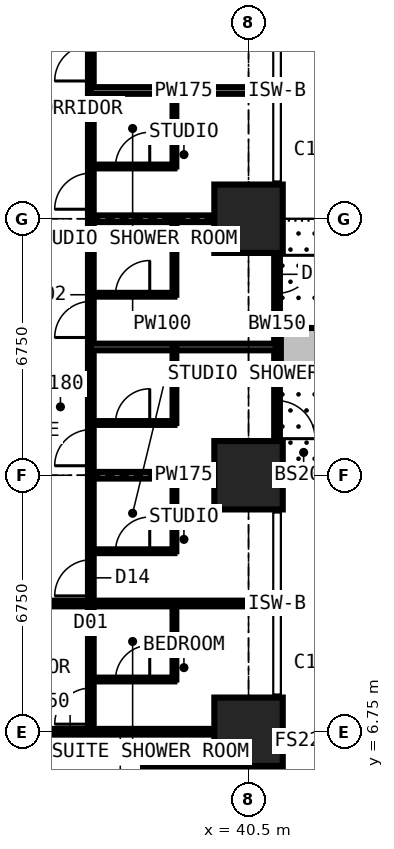
"""IFC4 building model, lengths in metres.
Left out: names, types, materials, properties, quantities, classifications, styles, units other than length and angle.
Written with IfcOpenShell. Run it as: python <this file> out.ifc"""

import sys

from ifc_helpers import new_model, si_unit, direction, frame, frame_2d, origin, origin_2d, place, context, subcontext, project, spatial, rectangle, extrude, element, fill, save


model = new_model("IFC4")
c1 = context("Model", 3, precision=1e-05, world=origin(), true_north=direction((0.0, 1.0)))
c2 = subcontext(c1, "Body", "Model", "MODEL_VIEW")
j1 = project(units=[si_unit("LENGTHUNIT", "METRE"), si_unit("PLANEANGLEUNIT", "RADIAN")], contexts=[c1])
p1 = place(None, origin())
s1 = spatial("IfcSite", under=j1, at=p1, CompositionType="ELEMENT")
p2 = place(p1, origin())
s2 = spatial("IfcBuilding", under=s1, at=p2, CompositionType="ELEMENT")
p3 = place(p2, frame((0.0, 0.0, 94.5)))
s3 = spatial("IfcBuildingStorey", under=s2, at=p3, CompositionType="ELEMENT", Elevation=94.5)
for number, where, z_axis, x_axis in (
    (1, (40.5, 6.75, 0.0), (0.0, 0.0, 1.0), (1.0, 0.0, 0.0)),
    (2, (40.5, 13.5, 0.0), (0.0, 0.0, 1.0), (1.0, 0.0, 0.0)),
    (3, (40.5, 20.25, 0.0), (0.0, 0.0, 1.0), (1.0, 0.0, 0.0)),
):
    element("IfcColumn", number, at=place(p3, frame(where, z_axis=z_axis, x_axis=x_axis)), inside=s3, PredefinedType="COLUMN", context=c2, shape_type="SweptSolid", body=[
        extrude(rectangle(XDim=1.8, YDim=1.8, at=origin_2d()), origin(), (0.0, 0.0, 1.0), 3.6),
    ])
p4 = place(p3, frame((41.25, 20.25, 0.0), z_axis=(0.0, 0.0, 1.0), x_axis=(0.0, -1.0, 0.0)))
e4 = element("IfcWall", 4, at=p4, inside=s3, PredefinedType="SOLIDWALL", context=c2, shape_type="SweptSolid", body=[
    extrude(rectangle(XDim=6.75, YDim=0.15, at=frame_2d((3.375, 0.0))), origin(), (0.0, 0.0, 1.0), 3.375),
])
p5 = place(p4, frame((0.962, 0.0, 0.0)))
e5 = element("IfcOpeningElement", 5, at=p5, cuts=e4, PredefinedType="OPENING", context=c2, shape_type="SweptSolid", body=[
    extrude(rectangle(XDim=1.0, YDim=2.2, at=frame_2d((0.5, 1.1))), frame((0.0, 0.085, 0.0), z_axis=(0.0, -1.0, 0.0), x_axis=(1.0, 0.0, 0.0)), (0.0, 0.0, 1.0), 0.17),
])
p6 = place(p4, frame((2.025, 0.0, 0.9)))
e6 = element("IfcOpeningElement", 6, at=p6, cuts=e4, PredefinedType="OPENING", context=c2, shape_type="SweptSolid", body=[
    extrude(rectangle(XDim=1.2, YDim=1.8, at=frame_2d((0.6, 0.9))), frame((0.0, 0.085, 0.0), z_axis=(0.0, -1.0, 0.0), x_axis=(1.0, 0.0, 0.0)), (0.0, 0.0, 1.0), 0.17),
])
p7 = place(p4, frame((4.788, 0.0, 0.0)))
e7 = element("IfcOpeningElement", 7, at=p7, cuts=e4, PredefinedType="OPENING", context=c2, shape_type="SweptSolid", body=[
    extrude(rectangle(XDim=1.0, YDim=2.2, at=frame_2d((0.5, 1.1))), frame((0.0, 0.085, 0.0), z_axis=(0.0, -1.0, 0.0), x_axis=(1.0, 0.0, 0.0)), (0.0, 0.0, 1.0), 0.17),
])
p8 = place(p4, frame((3.525, 0.0, 0.9)))
e8 = element("IfcOpeningElement", 8, at=p8, cuts=e4, PredefinedType="OPENING", context=c2, shape_type="SweptSolid", body=[
    extrude(rectangle(XDim=1.2, YDim=1.8, at=frame_2d((0.6, 0.9))), frame((0.0, 0.085, 0.0), z_axis=(0.0, -1.0, 0.0), x_axis=(1.0, 0.0, 0.0)), (0.0, 0.0, 1.0), 0.17),
])
p9 = place(p3, frame((37.875, 2.625, 0.0), z_axis=(0.0, 0.0, 1.0), x_axis=(0.0, 1.0, 0.0)))
e9 = element("IfcWall", 9, at=p9, inside=s3, PredefinedType="SOLIDWALL", context=c2, shape_type="SweptSolid", body=[
    extrude(rectangle(XDim=3.375, YDim=0.3, at=frame_2d((1.688, 0.0))), origin(), (0.0, 0.0, 1.0), 3.375),
])
p10 = place(p9, frame((0.788, 0.0, 0.6)))
e10 = element("IfcOpeningElement", 10, at=p10, cuts=e9, PredefinedType="OPENING", context=c2, shape_type="SweptSolid", body=[
    extrude(rectangle(XDim=1.8, YDim=2.1, at=frame_2d((0.9, 1.05))), frame((0.0, 0.16, 0.0), z_axis=(0.0, -1.0, 0.0), x_axis=(1.0, 0.0, 0.0)), (0.0, 0.0, 1.0), 0.32),
])
p11 = place(p3, frame((37.875, 6.0, 0.0), z_axis=(0.0, 0.0, 1.0), x_axis=(1.0, 0.0, 0.0)))
e11 = element("IfcWall", 11, at=p11, inside=s3, PredefinedType="SOLIDWALL", context=c2, shape_type="SweptSolid", body=[
    extrude(rectangle(XDim=3.375, YDim=0.3, at=frame_2d((1.688, 0.0))), origin(), (0.0, 0.0, 1.0), 3.375),
])
p12 = place(p11, frame((0.343, 0.0, 0.9)))
e12 = element("IfcOpeningElement", 12, at=p12, cuts=e11, PredefinedType="OPENING", context=c2, shape_type="SweptSolid", body=[
    extrude(rectangle(XDim=1.2, YDim=1.8, at=frame_2d((0.6, 0.9))), frame((0.0, 0.16, 0.0), z_axis=(0.0, -1.0, 0.0), x_axis=(1.0, 0.0, 0.0)), (0.0, 0.0, 1.0), 0.32),
])
p13 = place(p3, frame((41.35, 16.875, 0.0), z_axis=(0.0, 0.0, 1.0), x_axis=(1.0, 0.0, 0.0)))
e13 = element("IfcWall", 13, at=p13, inside=s3, PredefinedType="USERDEFINED", context=c2, shape_type="SweptSolid", body=[
    extrude(rectangle(XDim=2.2, YDim=1.0, at=frame_2d((1.1, 0.0))), origin(), (0.0, 0.0, 1.0), 0.9),
])
p14 = place(p3, frame((30.375, 6.75, 0.0), z_axis=(0.0, 0.0, 1.0), x_axis=(1.0, 0.0, 0.0)))
e14 = element("IfcWall", 14, at=p14, inside=s3, PredefinedType="PARTITIONING", context=c2, shape_type="SweptSolid", body=[
    extrude(rectangle(XDim=10.859, YDim=0.15, at=frame_2d((5.429, 0.0))), origin(), (0.0, 0.0, 1.0), 2.877),
])
p15 = place(p14, frame((1.45, 0.0, 0.0)))
e15 = element("IfcOpeningElement", 15, at=p15, cuts=e14, PredefinedType="OPENING", context=c2, shape_type="SweptSolid", body=[
    extrude(rectangle(XDim=1.0, YDim=2.2, at=frame_2d((0.5, 1.1))), frame((0.0, 0.085, 0.0), z_axis=(0.0, -1.0, 0.0), x_axis=(1.0, 0.0, 0.0)), (0.0, 0.0, 1.0), 0.17),
])
p16 = place(p3, frame((30.375, 10.125, 0.0), z_axis=(0.0, 0.0, 1.0), x_axis=(1.0, 0.0, 0.0)))
e16 = element("IfcWall", 16, at=p16, inside=s3, PredefinedType="PARTITIONING", context=c2, shape_type="SweptSolid", body=[
    extrude(rectangle(XDim=10.859, YDim=0.15, at=frame_2d((5.429, 0.0))), origin(), (0.0, 0.0, 1.0), 3.375),
])
p17 = place(p16, frame((2.5, 0.0, 0.0)))
e17 = element("IfcOpeningElement", 17, at=p17, cuts=e16, PredefinedType="OPENING", context=c2, shape_type="SweptSolid", body=[
    extrude(rectangle(XDim=1.0, YDim=2.2, at=frame_2d((0.5, 1.1))), frame((0.0, 0.085, 0.0), z_axis=(0.0, -1.0, 0.0), x_axis=(1.0, 0.0, 0.0)), (0.0, 0.0, 1.0), 0.17),
])
p18 = place(p3, frame((36.35, 6.75, 0.0), z_axis=(0.0, 0.0, 1.0), x_axis=(0.0, 1.0, 0.0)))
e18 = element("IfcWall", 18, at=p18, inside=s3, PredefinedType="PARTITIONING", context=c2, shape_type="SweptSolid", body=[
    extrude(rectangle(XDim=20.25, YDim=0.15, at=frame_2d((10.125, 0.0))), origin(), (0.0, 0.0, 1.0), 3.375),
])
p19 = place(p18, frame((0.2, 0.0, 0.0)))
e19 = element("IfcOpeningElement", 19, at=p19, cuts=e18, PredefinedType="OPENING", context=c2, shape_type="SweptSolid", body=[
    extrude(rectangle(XDim=0.95, YDim=2.2, at=frame_2d((0.475, 1.1))), frame((0.0, 0.085, 0.0), z_axis=(0.0, -1.0, 0.0), x_axis=(1.0, 0.0, 0.0)), (0.0, 0.0, 1.0), 0.17),
])
p20 = place(p18, frame((3.575, 0.0, 0.0)))
e20 = element("IfcOpeningElement", 20, at=p20, cuts=e18, PredefinedType="OPENING", context=c2, shape_type="SweptSolid", body=[
    extrude(rectangle(XDim=0.95, YDim=2.2, at=frame_2d((0.475, 1.1))), frame((0.0, 0.085, 0.0), z_axis=(0.0, -1.0, 0.0), x_axis=(1.0, 0.0, 0.0)), (0.0, 0.0, 1.0), 0.17),
])
p21 = place(p18, frame((7.0, 0.0, 0.0)))
e21 = element("IfcOpeningElement", 21, at=p21, cuts=e18, PredefinedType="OPENING", context=c2, shape_type="SweptSolid", body=[
    extrude(rectangle(XDim=0.95, YDim=2.2, at=frame_2d((0.475, 1.1))), frame((0.0, 0.085, 0.0), z_axis=(0.0, -1.0, 0.0), x_axis=(1.0, 0.0, 0.0)), (0.0, 0.0, 1.0), 0.17),
])
p22 = place(p18, frame((10.375, 0.0, 0.0)))
e22 = element("IfcOpeningElement", 22, at=p22, cuts=e18, PredefinedType="OPENING", context=c2, shape_type="SweptSolid", body=[
    extrude(rectangle(XDim=0.95, YDim=2.2, at=frame_2d((0.475, 1.1))), frame((0.0, 0.085, 0.0), z_axis=(0.0, -1.0, 0.0), x_axis=(1.0, 0.0, 0.0)), (0.0, 0.0, 1.0), 0.17),
])
p23 = place(p18, frame((13.75, 0.0, 0.0)))
e23 = element("IfcOpeningElement", 23, at=p23, cuts=e18, PredefinedType="OPENING", context=c2, shape_type="SweptSolid", body=[
    extrude(rectangle(XDim=0.95, YDim=2.2, at=frame_2d((0.475, 1.1))), frame((0.0, 0.085, 0.0), z_axis=(0.0, -1.0, 0.0), x_axis=(1.0, 0.0, 0.0)), (0.0, 0.0, 1.0), 0.17),
])
p24 = place(p18, frame((17.125, 0.0, 0.0)))
e24 = element("IfcOpeningElement", 24, at=p24, cuts=e18, PredefinedType="OPENING", context=c2, shape_type="SweptSolid", body=[
    extrude(rectangle(XDim=0.95, YDim=2.2, at=frame_2d((0.475, 1.1))), frame((0.0, 0.085, 0.0), z_axis=(0.0, -1.0, 0.0), x_axis=(1.0, 0.0, 0.0)), (0.0, 0.0, 1.0), 0.17),
])
p25 = place(p3, frame((36.35, 8.125, 0.0), z_axis=(0.0, 0.0, 1.0), x_axis=(1.0, 0.0, 0.0)))
e25 = element("IfcWall", 25, at=p25, inside=s3, PredefinedType="PARTITIONING", context=c2, shape_type="SweptSolid", body=[
    extrude(rectangle(XDim=2.2, YDim=0.1, at=frame_2d((1.1, 0.0))), origin(), (0.0, 0.0, 1.0), 3.375),
])
p26 = place(p25, frame((0.65, 0.0, 0.0)))
e26 = element("IfcOpeningElement", 26, at=p26, cuts=e25, PredefinedType="OPENING", context=c2, shape_type="SweptSolid", body=[
    extrude(rectangle(XDim=0.9, YDim=2.2, at=frame_2d((0.45, 1.1))), frame((0.0, 0.06, 0.0), z_axis=(0.0, -1.0, 0.0), x_axis=(1.0, 0.0, 0.0)), (0.0, 0.0, 1.0), 0.12),
])
p27 = place(p3, frame((36.35, 11.5, 0.0), z_axis=(0.0, 0.0, 1.0), x_axis=(1.0, 0.0, 0.0)))
e27 = element("IfcWall", 27, at=p27, inside=s3, PredefinedType="PARTITIONING", context=c2, shape_type="SweptSolid", body=[
    extrude(rectangle(XDim=2.2, YDim=0.1, at=frame_2d((1.1, 0.0))), origin(), (0.0, 0.0, 1.0), 3.375),
])
p28 = place(p27, frame((0.65, 0.0, 0.0)))
e28 = element("IfcOpeningElement", 28, at=p28, cuts=e27, PredefinedType="OPENING", context=c2, shape_type="SweptSolid", body=[
    extrude(rectangle(XDim=0.9, YDim=2.2, at=frame_2d((0.45, 1.1))), frame((0.0, 0.06, 0.0), z_axis=(0.0, -1.0, 0.0), x_axis=(1.0, 0.0, 0.0)), (0.0, 0.0, 1.0), 0.12),
])
p29 = place(p3, frame((36.35, 13.5, 0.0), z_axis=(0.0, 0.0, 1.0), x_axis=(1.0, 0.0, 0.0)))
e29 = element("IfcWall", 29, at=p29, inside=s3, PredefinedType="PARTITIONING", context=c2, shape_type="SweptSolid", body=[
    extrude(rectangle(XDim=4.884, YDim=0.175, at=frame_2d((2.442, 0.0))), origin(), (0.0, 0.0, 1.0), 2.877),
])
p30 = place(p3, frame((36.35, 14.875, 0.0), z_axis=(0.0, 0.0, 1.0), x_axis=(1.0, 0.0, 0.0)))
e30 = element("IfcWall", 30, at=p30, inside=s3, PredefinedType="PARTITIONING", context=c2, shape_type="SweptSolid", body=[
    extrude(rectangle(XDim=2.2, YDim=0.1, at=frame_2d((1.1, 0.0))), origin(), (0.0, 0.0, 1.0), 3.375),
])
p31 = place(p30, frame((0.65, 0.0, 0.0)))
e31 = element("IfcOpeningElement", 31, at=p31, cuts=e30, PredefinedType="OPENING", context=c2, shape_type="SweptSolid", body=[
    extrude(rectangle(XDim=0.9, YDim=2.2, at=frame_2d((0.45, 1.1))), frame((0.0, 0.06, 0.0), z_axis=(0.0, -1.0, 0.0), x_axis=(1.0, 0.0, 0.0)), (0.0, 0.0, 1.0), 0.12),
])
p32 = place(p3, frame((36.35, 16.875, 0.0), z_axis=(0.0, 0.0, 1.0), x_axis=(1.0, 0.0, 0.0)))
e32 = element("IfcWall", 32, at=p32, inside=s3, PredefinedType="PARTITIONING", context=c2, shape_type="SweptSolid", body=[
    extrude(rectangle(XDim=4.884, YDim=0.175, at=frame_2d((2.442, 0.0))), origin(), (0.0, 0.0, 1.0), 3.375),
])
p33 = place(p3, frame((36.35, 18.25, 0.0), z_axis=(0.0, 0.0, 1.0), x_axis=(1.0, 0.0, 0.0)))
e33 = element("IfcWall", 33, at=p33, inside=s3, PredefinedType="PARTITIONING", context=c2, shape_type="SweptSolid", body=[
    extrude(rectangle(XDim=2.2, YDim=0.1, at=frame_2d((1.1, 0.0))), origin(), (0.0, 0.0, 1.0), 3.375),
])
p34 = place(p33, frame((0.65, 0.0, 0.0)))
e34 = element("IfcOpeningElement", 34, at=p34, cuts=e33, PredefinedType="OPENING", context=c2, shape_type="SweptSolid", body=[
    extrude(rectangle(XDim=0.9, YDim=2.2, at=frame_2d((0.45, 1.1))), frame((0.0, 0.06, 0.0), z_axis=(0.0, -1.0, 0.0), x_axis=(1.0, 0.0, 0.0)), (0.0, 0.0, 1.0), 0.12),
])
p35 = place(p3, frame((36.35, 20.25, 0.0), z_axis=(0.0, 0.0, 1.0), x_axis=(1.0, 0.0, 0.0)))
e35 = element("IfcWall", 35, at=p35, inside=s3, PredefinedType="PARTITIONING", context=c2, shape_type="SweptSolid", body=[
    extrude(rectangle(XDim=4.884, YDim=0.175, at=frame_2d((2.442, 0.0))), origin(), (0.0, 0.0, 1.0), 2.877),
])
p36 = place(p3, frame((36.35, 21.625, 0.0), z_axis=(0.0, 0.0, 1.0), x_axis=(1.0, 0.0, 0.0)))
e36 = element("IfcWall", 36, at=p36, inside=s3, PredefinedType="PARTITIONING", context=c2, shape_type="SweptSolid", body=[
    extrude(rectangle(XDim=2.2, YDim=0.1, at=frame_2d((1.1, 0.0))), origin(), (0.0, 0.0, 1.0), 3.375),
])
p37 = place(p36, frame((0.65, 0.0, 0.0)))
e37 = element("IfcOpeningElement", 37, at=p37, cuts=e36, PredefinedType="OPENING", context=c2, shape_type="SweptSolid", body=[
    extrude(rectangle(XDim=0.9, YDim=2.2, at=frame_2d((0.45, 1.1))), frame((0.0, 0.06, 0.0), z_axis=(0.0, -1.0, 0.0), x_axis=(1.0, 0.0, 0.0)), (0.0, 0.0, 1.0), 0.12),
])
p38 = place(p3, frame((36.35, 23.625, 0.0), z_axis=(0.0, 0.0, 1.0), x_axis=(1.0, 0.0, 0.0)))
e38 = element("IfcWall", 38, at=p38, inside=s3, PredefinedType="PARTITIONING", context=c2, shape_type="SweptSolid", body=[
    extrude(rectangle(XDim=4.884, YDim=0.175, at=frame_2d((2.442, 0.0))), origin(), (0.0, 0.0, 1.0), 3.375),
])
for number, where, z_axis, x_axis in (
    (39, (38.55, 8.125, 0.0), (0.0, 0.0, 1.0), (0.0, 1.0, 0.0)),
    (40, (38.55, 11.5, 0.0), (0.0, 0.0, 1.0), (0.0, 1.0, 0.0)),
    (41, (38.55, 14.875, 0.0), (0.0, 0.0, 1.0), (0.0, 1.0, 0.0)),
    (42, (38.55, 18.25, 0.0), (0.0, 0.0, 1.0), (0.0, 1.0, 0.0)),
    (43, (38.55, 21.625, 0.0), (0.0, 0.0, 1.0), (0.0, 1.0, 0.0)),
):
    element("IfcWall", number, at=place(p3, frame(where, z_axis=z_axis, x_axis=x_axis)), inside=s3, PredefinedType="PARTITIONING", context=c2, shape_type="SweptSolid", body=[
        extrude(rectangle(XDim=2.0, YDim=0.1, at=frame_2d((1.0, 0.0))), origin(), (0.0, 0.0, 1.0), 3.375),
    ])
p39 = place(p5, origin())
e44 = element("IfcDoor", 44, at=p39, inside=s3, OperationType="SINGLE_SWING_LEFT", PredefinedType="DOOR", context=c2, shape_type="SweptSolid", body=[
    extrude(rectangle(XDim=1.0, YDim=2.2, at=frame_2d((0.5, 1.1))), frame((0.0, 0.025, 0.0), z_axis=(0.0, -1.0, 0.0), x_axis=(1.0, 0.0, 0.0)), (0.0, 0.0, 1.0), 0.05),
])
fill(e5, e44)
p40 = place(p6, origin())
e45 = element("IfcWindow", 45, at=p40, inside=s3, PartitioningType="SINGLE_PANEL", PredefinedType="WINDOW", context=c2, shape_type="SweptSolid", body=[
    extrude(rectangle(XDim=1.2, YDim=1.8, at=frame_2d((0.6, 0.9))), frame((0.0, 0.03, 0.0), z_axis=(0.0, -1.0, 0.0), x_axis=(1.0, 0.0, 0.0)), (0.0, 0.0, 1.0), 0.06),
])
fill(e6, e45)
p41 = place(p7, origin())
e46 = element("IfcDoor", 46, at=p41, inside=s3, OperationType="SINGLE_SWING_RIGHT", PredefinedType="DOOR", context=c2, shape_type="SweptSolid", body=[
    extrude(rectangle(XDim=1.0, YDim=2.2, at=frame_2d((0.5, 1.1))), frame((0.0, 0.025, 0.0), z_axis=(0.0, -1.0, 0.0), x_axis=(1.0, 0.0, 0.0)), (0.0, 0.0, 1.0), 0.05),
])
fill(e7, e46)
p42 = place(p8, origin())
e47 = element("IfcWindow", 47, at=p42, inside=s3, PartitioningType="SINGLE_PANEL", PredefinedType="WINDOW", context=c2, shape_type="SweptSolid", body=[
    extrude(rectangle(XDim=1.2, YDim=1.8, at=frame_2d((0.6, 0.9))), frame((0.0, 0.03, 0.0), z_axis=(0.0, -1.0, 0.0), x_axis=(1.0, 0.0, 0.0)), (0.0, 0.0, 1.0), 0.06),
])
fill(e8, e47)
p43 = place(p12, origin())
e48 = element("IfcWindow", 48, at=p43, inside=s3, PartitioningType="SINGLE_PANEL", PredefinedType="WINDOW", context=c2, shape_type="SweptSolid", body=[
    extrude(rectangle(XDim=1.2, YDim=1.8, at=frame_2d((0.6, 0.9))), frame((0.0, 0.03, 0.0), z_axis=(0.0, -1.0, 0.0), x_axis=(1.0, 0.0, 0.0)), (0.0, 0.0, 1.0), 0.06),
])
fill(e12, e48)
p44 = place(p19, origin())
e49 = element("IfcDoor", 49, at=p44, inside=s3, OperationType="SINGLE_SWING_LEFT", PredefinedType="DOOR", context=c2, shape_type="SweptSolid", body=[
    extrude(rectangle(XDim=0.95, YDim=2.2, at=frame_2d((0.475, 1.1))), frame((0.0, 0.025, 0.0), z_axis=(0.0, -1.0, 0.0), x_axis=(1.0, 0.0, 0.0)), (0.0, 0.0, 1.0), 0.05),
])
fill(e19, e49)
p45 = place(p26, origin())
e50 = element("IfcDoor", 50, at=p45, inside=s3, OperationType="SINGLE_SWING_RIGHT", PredefinedType="DOOR", context=c2, shape_type="SweptSolid", body=[
    extrude(rectangle(XDim=0.9, YDim=2.2, at=frame_2d((0.45, 1.1))), frame((0.0, 0.025, 0.0), z_axis=(0.0, -1.0, 0.0), x_axis=(1.0, 0.0, 0.0)), (0.0, 0.0, 1.0), 0.05),
])
fill(e26, e50)
p46 = place(p20, origin())
e51 = element("IfcDoor", 51, at=p46, inside=s3, OperationType="SINGLE_SWING_LEFT", PredefinedType="DOOR", context=c2, shape_type="SweptSolid", body=[
    extrude(rectangle(XDim=0.95, YDim=2.2, at=frame_2d((0.475, 1.1))), frame((0.0, 0.025, 0.0), z_axis=(0.0, -1.0, 0.0), x_axis=(1.0, 0.0, 0.0)), (0.0, 0.0, 1.0), 0.05),
])
fill(e20, e51)
p47 = place(p28, origin())
e52 = element("IfcDoor", 52, at=p47, inside=s3, OperationType="SINGLE_SWING_RIGHT", PredefinedType="DOOR", context=c2, shape_type="SweptSolid", body=[
    extrude(rectangle(XDim=0.9, YDim=2.2, at=frame_2d((0.45, 1.1))), frame((0.0, 0.025, 0.0), z_axis=(0.0, -1.0, 0.0), x_axis=(1.0, 0.0, 0.0)), (0.0, 0.0, 1.0), 0.05),
])
fill(e28, e52)
p48 = place(p21, origin())
e53 = element("IfcDoor", 53, at=p48, inside=s3, OperationType="SINGLE_SWING_LEFT", PredefinedType="DOOR", context=c2, shape_type="SweptSolid", body=[
    extrude(rectangle(XDim=0.95, YDim=2.2, at=frame_2d((0.475, 1.1))), frame((0.0, 0.025, 0.0), z_axis=(0.0, -1.0, 0.0), x_axis=(1.0, 0.0, 0.0)), (0.0, 0.0, 1.0), 0.05),
])
fill(e21, e53)
p49 = place(p31, origin())
e54 = element("IfcDoor", 54, at=p49, inside=s3, OperationType="SINGLE_SWING_RIGHT", PredefinedType="DOOR", context=c2, shape_type="SweptSolid", body=[
    extrude(rectangle(XDim=0.9, YDim=2.2, at=frame_2d((0.45, 1.1))), frame((0.0, 0.025, 0.0), z_axis=(0.0, -1.0, 0.0), x_axis=(1.0, 0.0, 0.0)), (0.0, 0.0, 1.0), 0.05),
])
fill(e31, e54)
p50 = place(p22, origin())
e55 = element("IfcDoor", 55, at=p50, inside=s3, OperationType="SINGLE_SWING_LEFT", PredefinedType="DOOR", context=c2, shape_type="SweptSolid", body=[
    extrude(rectangle(XDim=0.95, YDim=2.2, at=frame_2d((0.475, 1.1))), frame((0.0, 0.025, 0.0), z_axis=(0.0, -1.0, 0.0), x_axis=(1.0, 0.0, 0.0)), (0.0, 0.0, 1.0), 0.05),
])
fill(e22, e55)
p51 = place(p34, origin())
e56 = element("IfcDoor", 56, at=p51, inside=s3, OperationType="SINGLE_SWING_RIGHT", PredefinedType="DOOR", context=c2, shape_type="SweptSolid", body=[
    extrude(rectangle(XDim=0.9, YDim=2.2, at=frame_2d((0.45, 1.1))), frame((0.0, 0.025, 0.0), z_axis=(0.0, -1.0, 0.0), x_axis=(1.0, 0.0, 0.0)), (0.0, 0.0, 1.0), 0.05),
])
fill(e34, e56)
p52 = place(p23, origin())
e57 = element("IfcDoor", 57, at=p52, inside=s3, OperationType="SINGLE_SWING_LEFT", PredefinedType="DOOR", context=c2, shape_type="SweptSolid", body=[
    extrude(rectangle(XDim=0.95, YDim=2.2, at=frame_2d((0.475, 1.1))), frame((0.0, 0.025, 0.0), z_axis=(0.0, -1.0, 0.0), x_axis=(1.0, 0.0, 0.0)), (0.0, 0.0, 1.0), 0.05),
])
fill(e23, e57)
p53 = place(p37, origin())
e58 = element("IfcDoor", 58, at=p53, inside=s3, OperationType="SINGLE_SWING_RIGHT", PredefinedType="DOOR", context=c2, shape_type="SweptSolid", body=[
    extrude(rectangle(XDim=0.9, YDim=2.2, at=frame_2d((0.45, 1.1))), frame((0.0, 0.025, 0.0), z_axis=(0.0, -1.0, 0.0), x_axis=(1.0, 0.0, 0.0)), (0.0, 0.0, 1.0), 0.05),
])
fill(e37, e58)
p54 = place(p24, origin())
e59 = element("IfcDoor", 59, at=p54, inside=s3, OperationType="SINGLE_SWING_LEFT", PredefinedType="DOOR", context=c2, shape_type="SweptSolid", body=[
    extrude(rectangle(XDim=0.95, YDim=2.2, at=frame_2d((0.475, 1.1))), frame((0.0, 0.025, 0.0), z_axis=(0.0, -1.0, 0.0), x_axis=(1.0, 0.0, 0.0)), (0.0, 0.0, 1.0), 0.05),
])
fill(e24, e59)
save(model, sys.argv[1])
